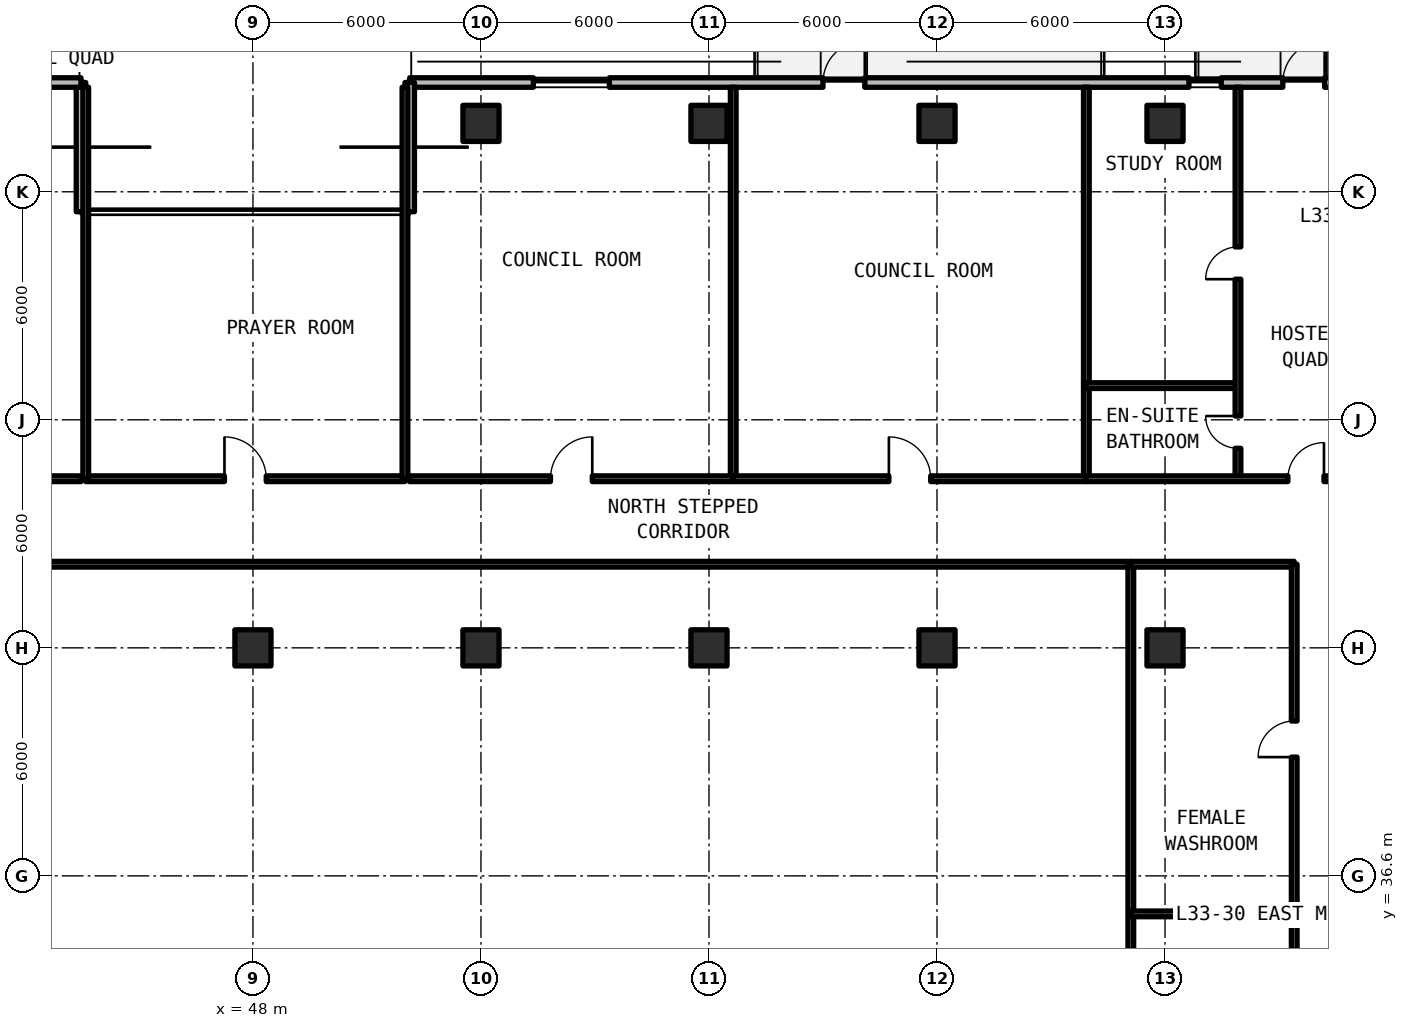
"""IFC4 building model, lengths in metres.
Left out: names, types, materials, properties, quantities, classifications, styles, units other than length and angle.
Written with IfcOpenShell. Run it as: python <this file> out.ifc"""

import sys

from ifc_helpers import new_model, si_unit, direction, frame, frame_2d, origin, origin_2d, place, context, subcontext, project, spatial, rectangle, extrude, element, fill, save


model = new_model("IFC4")
c1 = context("Model", 3, precision=1e-05, world=origin(), true_north=direction((0.0, 1.0)))
c2 = subcontext(c1, "Body", "Model", "MODEL_VIEW")
j1 = project(units=[si_unit("LENGTHUNIT", "METRE"), si_unit("PLANEANGLEUNIT", "RADIAN")], contexts=[c1])
p1 = place(None, origin())
s1 = spatial("IfcSite", under=j1, at=p1, CompositionType="ELEMENT")
p2 = place(p1, origin())
s2 = spatial("IfcBuilding", under=s1, at=p2, CompositionType="ELEMENT")
p3 = place(p2, frame((0.0, 0.0, 119.46)))
s3 = spatial("IfcBuildingStorey", under=s2, at=p3, CompositionType="ELEMENT", Elevation=119.46)
for number, where, z_axis, x_axis in (
    (1, (48.0, 42.6, 0.0), (0.0, 0.0, 1.0), (1.0, 0.0, 0.0)),
    (2, (54.0, 42.6, 0.0), (0.0, 0.0, 1.0), (1.0, 0.0, 0.0)),
    (3, (60.0, 42.6, 0.0), (0.0, 0.0, 1.0), (1.0, 0.0, 0.0)),
    (4, (66.0, 42.6, 0.0), (0.0, 0.0, 1.0), (1.0, 0.0, 0.0)),
    (5, (72.0, 42.6, 0.0), (0.0, 0.0, 1.0), (1.0, 0.0, 0.0)),
    (6, (54.0, 56.4, 0.0), (0.0, 0.0, 1.0), (1.0, 0.0, 0.0)),
    (7, (60.0, 56.4, 0.0), (0.0, 0.0, 1.0), (1.0, 0.0, 0.0)),
    (8, (66.0, 56.4, 0.0), (0.0, 0.0, 1.0), (1.0, 0.0, 0.0)),
    (9, (72.0, 56.4, 0.0), (0.0, 0.0, 1.0), (1.0, 0.0, 0.0)),
):
    element("IfcColumn", number, at=place(p3, frame(where, z_axis=z_axis, x_axis=x_axis)), inside=s3, PredefinedType="COLUMN", context=c2, shape_type="SweptSolid", body=[
        extrude(rectangle(XDim=0.95, YDim=0.95, at=origin_2d()), origin(), (0.0, 0.0, 1.0), 3.63),
    ])
p4 = place(p3, frame((96.148, 57.475, 0.0), z_axis=(0.0, 0.0, 1.0), x_axis=(-1.0, 0.0, 0.0)))
e10 = element("IfcWall", 10, at=p4, inside=s3, PredefinedType="SOLIDWALL", context=c2, shape_type="SweptSolid", body=[
    extrude(rectangle(XDim=44.023, YDim=0.25, at=frame_2d((22.012, 0.0))), origin(), (0.0, 0.0, 1.0), 3.35),
])
p5 = place(p4, frame((32.048, 0.0, 0.0)))
e11 = element("IfcOpeningElement", 11, at=p5, cuts=e10, PredefinedType="OPENING", context=c2, shape_type="SweptSolid", body=[
    extrude(rectangle(XDim=1.1, YDim=2.15, at=frame_2d((0.55, 1.075))), frame((0.0, 0.135, 0.0), z_axis=(0.0, -1.0, 0.0), x_axis=(1.0, 0.0, 0.0)), (0.0, 0.0, 1.0), 0.27),
])
p6 = place(p4, frame((19.948, 0.0, 0.0)))
e12 = element("IfcOpeningElement", 12, at=p6, cuts=e10, PredefinedType="OPENING", context=c2, shape_type="SweptSolid", body=[
    extrude(rectangle(XDim=1.1, YDim=2.15, at=frame_2d((0.55, 1.075))), frame((0.0, 0.135, 0.0), z_axis=(0.0, -1.0, 0.0), x_axis=(1.0, 0.0, 0.0)), (0.0, 0.0, 1.0), 0.27),
])
p7 = place(p4, frame((7.848, 0.0, 0.0)))
e13 = element("IfcOpeningElement", 13, at=p7, cuts=e10, PredefinedType="OPENING", context=c2, shape_type="SweptSolid", body=[
    extrude(rectangle(XDim=1.1, YDim=2.15, at=frame_2d((0.55, 1.075))), frame((0.0, 0.135, 0.0), z_axis=(0.0, -1.0, 0.0), x_axis=(1.0, 0.0, 0.0)), (0.0, 0.0, 1.0), 0.27),
])
p8 = place(p4, frame((38.769, 0.0, 0.78)))
e14 = element("IfcOpeningElement", 14, at=p8, cuts=e10, PredefinedType="OPENING", context=c2, shape_type="SweptSolid", body=[
    extrude(rectangle(XDim=2.0, YDim=1.66, at=frame_2d((1.0, 0.83))), frame((0.0, 0.135, 0.0), z_axis=(0.0, -1.0, 0.0), x_axis=(1.0, 0.0, 0.0)), (0.0, 0.0, 1.0), 0.27),
])
p9 = place(p4, frame((22.668, 0.0, 0.78)))
e15 = element("IfcOpeningElement", 15, at=p9, cuts=e10, PredefinedType="OPENING", context=c2, shape_type="SweptSolid", body=[
    extrude(rectangle(XDim=0.85, YDim=1.65, at=frame_2d((0.425, 0.825))), frame((0.0, 0.135, 0.0), z_axis=(0.0, -1.0, 0.0), x_axis=(1.0, 0.0, 0.0)), (0.0, 0.0, 1.0), 0.27),
])
p10 = place(p4, frame((14.119, 0.0, 0.78)))
e16 = element("IfcOpeningElement", 16, at=p10, cuts=e10, PredefinedType="OPENING", context=c2, shape_type="SweptSolid", body=[
    extrude(rectangle(XDim=2.0, YDim=1.66, at=frame_2d((1.0, 0.83))), frame((0.0, 0.135, 0.0), z_axis=(0.0, -1.0, 0.0), x_axis=(1.0, 0.0, 0.0)), (0.0, 0.0, 1.0), 0.27),
])
p11 = place(p4, frame((1.884, 0.0, 0.78)))
e17 = element("IfcOpeningElement", 17, at=p11, cuts=e10, PredefinedType="OPENING", context=c2, shape_type="SweptSolid", body=[
    extrude(rectangle(XDim=2.0, YDim=1.66, at=frame_2d((1.0, 0.83))), frame((0.0, 0.135, 0.0), z_axis=(0.0, -1.0, 0.0), x_axis=(1.0, 0.0, 0.0)), (0.0, 0.0, 1.0), 0.27),
])
for number, where, z_axis, x_axis in (
    (18, (52.125, 57.475, 0.0), (0.0, 0.0, 1.0), (0.0, -1.0, 0.0)),
    (19, (43.475, 54.075, 0.0), (0.0, 0.0, 1.0), (0.0, 1.0, 0.0)),
):
    element("IfcWall", number, at=place(p3, frame(where, z_axis=z_axis, x_axis=x_axis)), inside=s3, PredefinedType="SOLIDWALL", context=c2, shape_type="SweptSolid", body=[
        extrude(rectangle(XDim=3.4, YDim=0.25, at=frame_2d((1.7, 0.0))), origin(), (0.0, 0.0, 1.0), 3.35),
    ])
p12 = place(p3, frame((43.475, 57.475, 0.0), z_axis=(0.0, 0.0, 1.0), x_axis=(-1.0, 0.0, 0.0)))
e20 = element("IfcWall", 20, at=p12, inside=s3, PredefinedType="SOLIDWALL", context=c2, shape_type="SweptSolid", body=[
    extrude(rectangle(XDim=22.023, YDim=0.25, at=frame_2d((11.012, 0.0))), origin(), (0.0, 0.0, 1.0), 3.35),
])
p13 = place(p12, frame((9.175, 0.0, 0.0)))
e21 = element("IfcOpeningElement", 21, at=p13, cuts=e20, PredefinedType="OPENING", context=c2, shape_type="SweptSolid", body=[
    extrude(rectangle(XDim=1.1, YDim=2.15, at=frame_2d((0.55, 1.075))), frame((0.0, 0.135, 0.0), z_axis=(0.0, -1.0, 0.0), x_axis=(1.0, 0.0, 0.0)), (0.0, 0.0, 1.0), 0.27),
])
p14 = place(p12, frame((16.635, 0.0, 0.78)))
e22 = element("IfcOpeningElement", 22, at=p14, cuts=e20, PredefinedType="OPENING", context=c2, shape_type="SweptSolid", body=[
    extrude(rectangle(XDim=2.0, YDim=1.66, at=frame_2d((1.0, 0.83))), frame((0.0, 0.135, 0.0), z_axis=(0.0, -1.0, 0.0), x_axis=(1.0, 0.0, 0.0)), (0.0, 0.0, 1.0), 0.27),
])
p15 = place(p12, frame((14.173, 0.0, 0.78)))
e23 = element("IfcOpeningElement", 23, at=p15, cuts=e20, PredefinedType="OPENING", context=c2, shape_type="SweptSolid", body=[
    extrude(rectangle(XDim=0.85, YDim=1.65, at=frame_2d((0.425, 0.825))), frame((0.0, 0.135, 0.0), z_axis=(0.0, -1.0, 0.0), x_axis=(1.0, 0.0, 0.0)), (0.0, 0.0, 1.0), 0.27),
])
p16 = place(p12, frame((11.592, 0.0, 0.78)))
e24 = element("IfcOpeningElement", 24, at=p16, cuts=e20, PredefinedType="OPENING", context=c2, shape_type="SweptSolid", body=[
    extrude(rectangle(XDim=0.85, YDim=1.65, at=frame_2d((0.425, 0.825))), frame((0.0, 0.135, 0.0), z_axis=(0.0, -1.0, 0.0), x_axis=(1.0, 0.0, 0.0)), (0.0, 0.0, 1.0), 0.27),
])
p17 = place(p12, frame((4.141, 0.0, 0.78)))
e25 = element("IfcOpeningElement", 25, at=p17, cuts=e20, PredefinedType="OPENING", context=c2, shape_type="SweptSolid", body=[
    extrude(rectangle(XDim=0.85, YDim=1.65, at=frame_2d((0.425, 0.825))), frame((0.0, 0.135, 0.0), z_axis=(0.0, -1.0, 0.0), x_axis=(1.0, 0.0, 0.0)), (0.0, 0.0, 1.0), 0.27),
])
p18 = place(p12, frame((2.201, 0.0, 0.78)))
e26 = element("IfcOpeningElement", 26, at=p18, cuts=e20, PredefinedType="OPENING", context=c2, shape_type="SweptSolid", body=[
    extrude(rectangle(XDim=0.85, YDim=1.65, at=frame_2d((0.425, 0.825))), frame((0.0, 0.135, 0.0), z_axis=(0.0, -1.0, 0.0), x_axis=(1.0, 0.0, 0.0)), (0.0, 0.0, 1.0), 0.27),
])
p19 = place(p3, frame((42.1, 44.8, 0.0), z_axis=(0.0, 0.0, 1.0), x_axis=(1.0, 0.0, 0.0)))
e27 = element("IfcWall", 27, at=p19, inside=s3, PredefinedType="SOLIDWALL", context=c2, shape_type="SweptSolid", body=[
    extrude(rectangle(XDim=29.0, YDim=0.15, at=frame_2d((14.5, 0.0))), origin(), (0.0, 0.0, 1.0), 2.57),
])
p20 = place(p3, frame((71.1, 22.4, 0.0), z_axis=(0.0, 0.0, 1.0), x_axis=(0.0, 1.0, 0.0)))
e28 = element("IfcWall", 28, at=p20, inside=s3, PredefinedType="SOLIDWALL", context=c2, shape_type="SweptSolid", body=[
    extrude(rectangle(XDim=22.4, YDim=0.15, at=frame_2d((11.2, 0.0))), origin(), (0.0, 0.0, 1.0), 2.57),
])
p21 = place(p3, frame((71.1, 35.6, 0.0), z_axis=(0.0, 0.0, 1.0), x_axis=(1.0, 0.0, 0.0)))
e29 = element("IfcWall", 29, at=p21, inside=s3, PredefinedType="SOLIDWALL", context=c2, shape_type="SweptSolid", body=[
    extrude(rectangle(XDim=4.3, YDim=0.15, at=frame_2d((2.15, 0.0))), origin(), (0.0, 0.0, 1.0), 2.57),
])
p22 = place(p3, frame((75.4, 22.4, 0.0), z_axis=(0.0, 0.0, 1.0), x_axis=(0.0, 1.0, 0.0)))
e30 = element("IfcWall", 30, at=p22, inside=s3, PredefinedType="SOLIDWALL", context=c2, shape_type="SweptSolid", body=[
    extrude(rectangle(XDim=13.2, YDim=0.15, at=frame_2d((6.6, 0.0))), origin(), (0.0, 0.0, 1.0), 2.57),
])
p23 = place(p22, frame((6.125, 0.0, 0.0)))
e31 = element("IfcOpeningElement", 31, at=p23, cuts=e30, PredefinedType="OPENING", context=c2, shape_type="SweptSolid", body=[
    extrude(rectangle(XDim=0.95, YDim=2.15, at=frame_2d((0.475, 1.075))), frame((0.0, 0.085, 0.0), z_axis=(0.0, -1.0, 0.0), x_axis=(1.0, 0.0, 0.0)), (0.0, 0.0, 1.0), 0.17),
])
p24 = place(p3, frame((71.1, 44.8, 0.0), z_axis=(0.0, 0.0, 1.0), x_axis=(1.0, 0.0, 0.0)))
e32 = element("IfcWall", 32, at=p24, inside=s3, PredefinedType="SOLIDWALL", context=c2, shape_type="SweptSolid", body=[
    extrude(rectangle(XDim=4.3, YDim=0.15, at=frame_2d((2.15, 0.0))), origin(), (0.0, 0.0, 1.0), 2.57),
])
p25 = place(p3, frame((75.4, 35.6, 0.0), z_axis=(0.0, 0.0, 1.0), x_axis=(0.0, 1.0, 0.0)))
e33 = element("IfcWall", 33, at=p25, inside=s3, PredefinedType="SOLIDWALL", context=c2, shape_type="SweptSolid", body=[
    extrude(rectangle(XDim=9.2, YDim=0.15, at=frame_2d((4.6, 0.0))), origin(), (0.0, 0.0, 1.0), 2.57),
])
p26 = place(p25, frame((4.125, 0.0, 0.0)))
e34 = element("IfcOpeningElement", 34, at=p26, cuts=e33, PredefinedType="OPENING", context=c2, shape_type="SweptSolid", body=[
    extrude(rectangle(XDim=0.95, YDim=2.15, at=frame_2d((0.475, 1.075))), frame((0.0, 0.085, 0.0), z_axis=(0.0, -1.0, 0.0), x_axis=(1.0, 0.0, 0.0)), (0.0, 0.0, 1.0), 0.17),
])
p27 = place(p3, frame((43.6, 47.05, 0.0), z_axis=(0.0, 0.0, 1.0), x_axis=(1.0, 0.0, 0.0)))
e35 = element("IfcWall", 35, at=p27, inside=s3, PredefinedType="SOLIDWALL", context=c2, shape_type="SweptSolid", body=[
    extrude(rectangle(XDim=8.4, YDim=0.15, at=frame_2d((4.2, 0.0))), origin(), (0.0, 0.0, 1.0), 2.57),
])
p28 = place(p27, frame((3.65, 0.0, 0.0)))
e36 = element("IfcOpeningElement", 36, at=p28, cuts=e35, PredefinedType="OPENING", context=c2, shape_type="SweptSolid", body=[
    extrude(rectangle(XDim=1.1, YDim=2.15, at=frame_2d((0.55, 1.075))), frame((0.0, 0.085, 0.0), z_axis=(0.0, -1.0, 0.0), x_axis=(1.0, 0.0, 0.0)), (0.0, 0.0, 1.0), 0.17),
])
for number, where, z_axis, x_axis in (
    (37, (43.6, 47.05, 0.0), (0.0, 0.0, 1.0), (0.0, 1.0, 0.0)),
    (38, (52.0, 47.05, 0.0), (0.0, 0.0, 1.0), (0.0, 1.0, 0.0)),
):
    element("IfcWall", number, at=place(p3, frame(where, z_axis=z_axis, x_axis=x_axis)), inside=s3, PredefinedType="SOLIDWALL", context=c2, shape_type="SweptSolid", body=[
        extrude(rectangle(XDim=10.3, YDim=0.15, at=frame_2d((5.15, 0.0))), origin(), (0.0, 0.0, 1.0), 2.57),
    ])
p29 = place(p3, frame((37.961, 47.05, 0.0), z_axis=(0.0, 0.0, 1.0), x_axis=(1.0, 0.0, 0.0)))
e39 = element("IfcWall", 39, at=p29, inside=s3, PredefinedType="SOLIDWALL", context=c2, shape_type="SweptSolid", body=[
    extrude(rectangle(XDim=5.519, YDim=0.15, at=frame_2d((2.76, 0.0))), origin(), (0.0, 0.0, 1.0), 2.57),
])
p30 = place(p29, frame((3.263, 0.0, 0.0)))
e40 = element("IfcOpeningElement", 40, at=p30, cuts=e39, PredefinedType="OPENING", context=c2, shape_type="SweptSolid", body=[
    extrude(rectangle(XDim=0.95, YDim=2.15, at=frame_2d((0.475, 1.075))), frame((0.0, 0.085, 0.0), z_axis=(0.0, -1.0, 0.0), x_axis=(1.0, 0.0, 0.0)), (0.0, 0.0, 1.0), 0.17),
])
p31 = place(p3, frame((60.638, 47.05, 0.0), z_axis=(0.0, 0.0, 1.0), x_axis=(0.0, 1.0, 0.0)))
e41 = element("IfcWall", 41, at=p31, inside=s3, PredefinedType="SOLIDWALL", context=c2, shape_type="SweptSolid", body=[
    extrude(rectangle(XDim=10.3, YDim=0.15, at=frame_2d((5.15, 0.0))), origin(), (0.0, 0.0, 1.0), 2.57),
])
p32 = place(p3, frame((52.12, 47.05, 0.0), z_axis=(0.0, 0.0, 1.0), x_axis=(1.0, 0.0, 0.0)))
e42 = element("IfcWall", 42, at=p32, inside=s3, PredefinedType="SOLIDWALL", context=c2, shape_type="SweptSolid", body=[
    extrude(rectangle(XDim=8.518, YDim=0.15, at=frame_2d((4.259, 0.0))), origin(), (0.0, 0.0, 1.0), 2.57),
])
p33 = place(p32, frame((3.709, 0.0, 0.0)))
e43 = element("IfcOpeningElement", 43, at=p33, cuts=e42, PredefinedType="OPENING", context=c2, shape_type="SweptSolid", body=[
    extrude(rectangle(XDim=1.1, YDim=2.15, at=frame_2d((0.55, 1.075))), frame((0.0, 0.085, 0.0), z_axis=(0.0, -1.0, 0.0), x_axis=(1.0, 0.0, 0.0)), (0.0, 0.0, 1.0), 0.17),
])
p34 = place(p3, frame((69.93, 47.05, 0.0), z_axis=(0.0, 0.0, 1.0), x_axis=(0.0, 1.0, 0.0)))
e44 = element("IfcWall", 44, at=p34, inside=s3, PredefinedType="SOLIDWALL", context=c2, shape_type="SweptSolid", body=[
    extrude(rectangle(XDim=10.3, YDim=0.15, at=frame_2d((5.15, 0.0))), origin(), (0.0, 0.0, 1.0), 2.57),
])
p35 = place(p3, frame((60.638, 47.05, 0.0), z_axis=(0.0, 0.0, 1.0), x_axis=(1.0, 0.0, 0.0)))
e45 = element("IfcWall", 45, at=p35, inside=s3, PredefinedType="SOLIDWALL", context=c2, shape_type="SweptSolid", body=[
    extrude(rectangle(XDim=9.292, YDim=0.15, at=frame_2d((4.646, 0.0))), origin(), (0.0, 0.0, 1.0), 2.57),
])
p36 = place(p35, frame((4.096, 0.0, 0.0)))
e46 = element("IfcOpeningElement", 46, at=p36, cuts=e45, PredefinedType="OPENING", context=c2, shape_type="SweptSolid", body=[
    extrude(rectangle(XDim=1.1, YDim=2.15, at=frame_2d((0.55, 1.075))), frame((0.0, 0.085, 0.0), z_axis=(0.0, -1.0, 0.0), x_axis=(1.0, 0.0, 0.0)), (0.0, 0.0, 1.0), 0.17),
])
p37 = place(p3, frame((69.93, 49.5, 0.0), z_axis=(0.0, 0.0, 1.0), x_axis=(1.0, 0.0, 0.0)))
e47 = element("IfcWall", 47, at=p37, inside=s3, PredefinedType="PARTITIONING", context=c2, shape_type="SweptSolid", body=[
    extrude(rectangle(XDim=3.99, YDim=0.15, at=frame_2d((1.995, 0.0))), origin(), (0.0, 0.0, 1.0), 2.57),
])
p38 = place(p3, frame((73.92, 47.05, 0.0), z_axis=(0.0, 0.0, 1.0), x_axis=(0.0, 1.0, 0.0)))
e48 = element("IfcWall", 48, at=p38, inside=s3, PredefinedType="PARTITIONING", context=c2, shape_type="SweptSolid", body=[
    extrude(rectangle(XDim=10.3, YDim=0.15, at=frame_2d((5.15, 0.0))), origin(), (0.0, 0.0, 1.0), 2.57),
])
p39 = place(p38, frame((0.8, 0.0, 0.0)))
e49 = element("IfcOpeningElement", 49, at=p39, cuts=e48, PredefinedType="OPENING", context=c2, shape_type="SweptSolid", body=[
    extrude(rectangle(XDim=0.85, YDim=2.1, at=frame_2d((0.425, 1.05))), frame((0.0, 0.085, 0.0), z_axis=(0.0, -1.0, 0.0), x_axis=(1.0, 0.0, 0.0)), (0.0, 0.0, 1.0), 0.17),
])
p40 = place(p38, frame((5.25, 0.0, 0.0)))
e50 = element("IfcOpeningElement", 50, at=p40, cuts=e48, PredefinedType="OPENING", context=c2, shape_type="SweptSolid", body=[
    extrude(rectangle(XDim=0.85, YDim=2.1, at=frame_2d((0.425, 1.05))), frame((0.0, 0.085, 0.0), z_axis=(0.0, -1.0, 0.0), x_axis=(1.0, 0.0, 0.0)), (0.0, 0.0, 1.0), 0.17),
])
p41 = place(p3, frame((69.93, 47.05, 0.0), z_axis=(0.0, 0.0, 1.0), x_axis=(1.0, 0.0, 0.0)))
e51 = element("IfcWall", 51, at=p41, inside=s3, PredefinedType="SOLIDWALL", context=c2, shape_type="SweptSolid", body=[
    extrude(rectangle(XDim=7.485, YDim=0.15, at=frame_2d((3.743, 0.0))), origin(), (0.0, 0.0, 1.0), 2.57),
])
p42 = place(p41, frame((5.302, 0.0, 0.0)))
e52 = element("IfcOpeningElement", 52, at=p42, cuts=e51, PredefinedType="OPENING", context=c2, shape_type="SweptSolid", body=[
    extrude(rectangle(XDim=0.95, YDim=2.15, at=frame_2d((0.475, 1.075))), frame((0.0, 0.085, 0.0), z_axis=(0.0, -1.0, 0.0), x_axis=(1.0, 0.0, 0.0)), (0.0, 0.0, 1.0), 0.17),
])
p43 = place(p5, frame((1.1, 0.0, 0.0), z_axis=(0.0, 0.0, 1.0), x_axis=(-1.0, 0.0, 0.0)))
e53 = element("IfcDoor", 53, at=p43, inside=s3, OperationType="SINGLE_SWING_RIGHT", PredefinedType="DOOR", context=c2, shape_type="SweptSolid", body=[
    extrude(rectangle(XDim=1.1, YDim=2.15, at=frame_2d((0.55, 1.075))), frame((0.0, 0.025, 0.0), z_axis=(0.0, -1.0, 0.0), x_axis=(1.0, 0.0, 0.0)), (0.0, 0.0, 1.0), 0.05),
])
fill(e11, e53)
p44 = place(p6, frame((1.1, 0.0, 0.0), z_axis=(0.0, 0.0, 1.0), x_axis=(-1.0, 0.0, 0.0)))
e54 = element("IfcDoor", 54, at=p44, inside=s3, OperationType="SINGLE_SWING_LEFT", PredefinedType="DOOR", context=c2, shape_type="SweptSolid", body=[
    extrude(rectangle(XDim=1.1, YDim=2.15, at=frame_2d((0.55, 1.075))), frame((0.0, 0.025, 0.0), z_axis=(0.0, -1.0, 0.0), x_axis=(1.0, 0.0, 0.0)), (0.0, 0.0, 1.0), 0.05),
])
fill(e12, e54)
p45 = place(p8, origin())
e55 = element("IfcWindow", 55, at=p45, inside=s3, PartitioningType="SINGLE_PANEL", PredefinedType="WINDOW", context=c2, shape_type="SweptSolid", body=[
    extrude(rectangle(XDim=2.0, YDim=1.66, at=frame_2d((1.0, 0.83))), frame((0.0, 0.03, 0.0), z_axis=(0.0, -1.0, 0.0), x_axis=(1.0, 0.0, 0.0)), (0.0, 0.0, 1.0), 0.06),
])
fill(e14, e55)
p46 = place(p9, origin())
e56 = element("IfcWindow", 56, at=p46, inside=s3, PartitioningType="SINGLE_PANEL", PredefinedType="WINDOW", context=c2, shape_type="SweptSolid", body=[
    extrude(rectangle(XDim=0.85, YDim=1.65, at=frame_2d((0.425, 0.825))), frame((0.0, 0.03, 0.0), z_axis=(0.0, -1.0, 0.0), x_axis=(1.0, 0.0, 0.0)), (0.0, 0.0, 1.0), 0.06),
])
fill(e15, e56)
p47 = place(p26, origin())
e57 = element("IfcDoor", 57, at=p47, inside=s3, OperationType="SINGLE_SWING_LEFT", PredefinedType="DOOR", context=c2, shape_type="SweptSolid", body=[
    extrude(rectangle(XDim=0.95, YDim=2.15, at=frame_2d((0.475, 1.075))), frame((0.0, 0.025, 0.0), z_axis=(0.0, -1.0, 0.0), x_axis=(1.0, 0.0, 0.0)), (0.0, 0.0, 1.0), 0.05),
])
fill(e34, e57)
p48 = place(p28, origin())
e58 = element("IfcDoor", 58, at=p48, inside=s3, OperationType="SINGLE_SWING_LEFT", PredefinedType="DOOR", context=c2, shape_type="SweptSolid", body=[
    extrude(rectangle(XDim=1.1, YDim=2.15, at=frame_2d((0.55, 1.075))), frame((0.0, 0.025, 0.0), z_axis=(0.0, -1.0, 0.0), x_axis=(1.0, 0.0, 0.0)), (0.0, 0.0, 1.0), 0.05),
])
fill(e36, e58)
p49 = place(p33, origin())
e59 = element("IfcDoor", 59, at=p49, inside=s3, OperationType="SINGLE_SWING_RIGHT", PredefinedType="DOOR", context=c2, shape_type="SweptSolid", body=[
    extrude(rectangle(XDim=1.1, YDim=2.15, at=frame_2d((0.55, 1.075))), frame((0.0, 0.025, 0.0), z_axis=(0.0, -1.0, 0.0), x_axis=(1.0, 0.0, 0.0)), (0.0, 0.0, 1.0), 0.05),
])
fill(e43, e59)
p50 = place(p36, origin())
e60 = element("IfcDoor", 60, at=p50, inside=s3, OperationType="SINGLE_SWING_LEFT", PredefinedType="DOOR", context=c2, shape_type="SweptSolid", body=[
    extrude(rectangle(XDim=1.1, YDim=2.15, at=frame_2d((0.55, 1.075))), frame((0.0, 0.025, 0.0), z_axis=(0.0, -1.0, 0.0), x_axis=(1.0, 0.0, 0.0)), (0.0, 0.0, 1.0), 0.05),
])
fill(e46, e60)
p51 = place(p39, origin())
e61 = element("IfcDoor", 61, at=p51, inside=s3, OperationType="SINGLE_SWING_RIGHT", PredefinedType="DOOR", context=c2, shape_type="SweptSolid", body=[
    extrude(rectangle(XDim=0.85, YDim=2.1, at=frame_2d((0.425, 1.05))), frame((0.0, 0.025, 0.0), z_axis=(0.0, -1.0, 0.0), x_axis=(1.0, 0.0, 0.0)), (0.0, 0.0, 1.0), 0.05),
])
fill(e49, e61)
p52 = place(p40, origin())
e62 = element("IfcDoor", 62, at=p52, inside=s3, OperationType="SINGLE_SWING_LEFT", PredefinedType="DOOR", context=c2, shape_type="SweptSolid", body=[
    extrude(rectangle(XDim=0.85, YDim=2.1, at=frame_2d((0.425, 1.05))), frame((0.0, 0.025, 0.0), z_axis=(0.0, -1.0, 0.0), x_axis=(1.0, 0.0, 0.0)), (0.0, 0.0, 1.0), 0.05),
])
fill(e50, e62)
p53 = place(p42, origin())
e63 = element("IfcDoor", 63, at=p53, inside=s3, OperationType="SINGLE_SWING_RIGHT", PredefinedType="DOOR", context=c2, shape_type="SweptSolid", body=[
    extrude(rectangle(XDim=0.95, YDim=2.15, at=frame_2d((0.475, 1.075))), frame((0.0, 0.025, 0.0), z_axis=(0.0, -1.0, 0.0), x_axis=(1.0, 0.0, 0.0)), (0.0, 0.0, 1.0), 0.05),
])
fill(e52, e63)
save(model, sys.argv[1])
